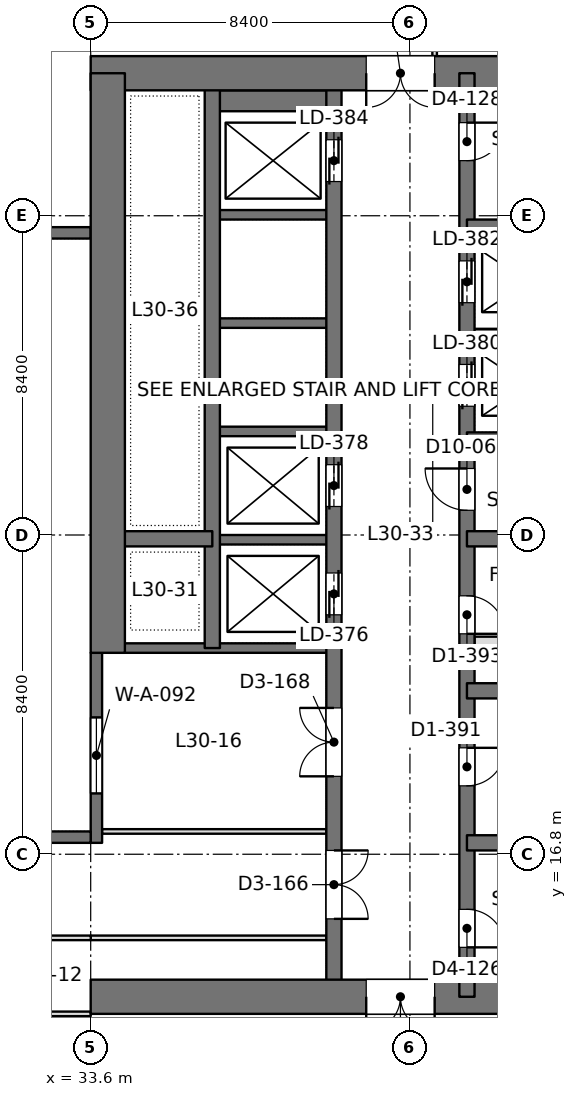
"""IFC4 building model, lengths in metres.
Left out: names, types, materials, properties, quantities, classifications, styles, units other than length and angle.
Written with IfcOpenShell. Run it as: python <this file> out.ifc"""

import sys

from ifc_helpers import new_model, si_unit, direction, frame, frame_2d, origin, place, context, subcontext, project, spatial, rectangle, extrude, element, fill, save


model = new_model("IFC4")
c1 = context("Model", 3, precision=1e-05, world=origin(), true_north=direction((0.0, 1.0)))
c2 = subcontext(c1, "Body", "Model", "MODEL_VIEW")
j1 = project(units=[si_unit("LENGTHUNIT", "METRE"), si_unit("PLANEANGLEUNIT", "RADIAN")], contexts=[c1])
p1 = place(None, origin())
s1 = spatial("IfcSite", under=j1, at=p1, CompositionType="ELEMENT")
p2 = place(p1, origin())
s2 = spatial("IfcBuilding", under=s1, at=p2, CompositionType="ELEMENT")
p3 = place(p2, frame((0.0, 0.0, 134.4)))
s3 = spatial("IfcBuildingStorey", under=s2, at=p3, CompositionType="ELEMENT", Elevation=134.4)
p4 = place(p3, frame((33.6, 13.05, 0.0), z_axis=(0.0, 0.0, 1.0), x_axis=(1.0, 0.0, 0.0)))
e1 = element("IfcWall", 1, at=p4, inside=s3, PredefinedType="SHEAR", context=c2, shape_type="SweptSolid", body=[
    extrude(rectangle(XDim=18.0, YDim=0.9, at=frame_2d((9.0, 0.0))), origin(), (0.0, 0.0, 1.0), 4.2),
])
p5 = place(p4, frame((7.25, 0.0, 0.0)))
e2 = element("IfcOpeningElement", 2, at=p5, cuts=e1, PredefinedType="OPENING", context=c2, shape_type="SweptSolid", body=[
    extrude(rectangle(XDim=1.8, YDim=2.4, at=frame_2d((0.9, 1.2))), frame((0.0, 0.46, 0.0), z_axis=(0.0, -1.0, 0.0), x_axis=(1.0, 0.0, 0.0)), (0.0, 0.0, 1.0), 0.92),
])
p6 = place(p3, frame((33.6, 37.35, 0.0), z_axis=(0.0, 0.0, 1.0), x_axis=(1.0, 0.0, 0.0)))
e3 = element("IfcWall", 3, at=p6, inside=s3, PredefinedType="SHEAR", context=c2, shape_type="SweptSolid", body=[
    extrude(rectangle(XDim=18.0, YDim=0.9, at=frame_2d((9.0, 0.0))), origin(), (0.0, 0.0, 1.0), 4.2),
])
p7 = place(p6, frame((7.25, 0.0, 0.0)))
e4 = element("IfcOpeningElement", 4, at=p7, cuts=e3, PredefinedType="OPENING", context=c2, shape_type="SweptSolid", body=[
    extrude(rectangle(XDim=1.8, YDim=2.4, at=frame_2d((0.9, 1.2))), frame((0.0, 0.46, 0.0), z_axis=(0.0, -1.0, 0.0), x_axis=(1.0, 0.0, 0.0)), (0.0, 0.0, 1.0), 0.92),
])
p8 = place(p3, frame((34.05, 22.1, 0.0), z_axis=(0.0, 0.0, 1.0), x_axis=(0.0, 1.0, 0.0)))
e5 = element("IfcWall", 5, at=p8, inside=s3, PredefinedType="SHEAR", context=c2, shape_type="SweptSolid", body=[
    extrude(rectangle(XDim=15.25, YDim=0.9, at=frame_2d((7.625, 0.0))), origin(), (0.0, 0.0, 1.0), 4.2),
])
p9 = place(p3, frame((43.5, 13.05, 0.0), z_axis=(0.0, 0.0, 1.0), x_axis=(0.0, 1.0, 0.0)))
e6 = element("IfcWall", 6, at=p9, inside=s3, PredefinedType="SHEAR", context=c2, shape_type="SweptSolid", body=[
    extrude(rectangle(XDim=24.3, YDim=0.4, at=frame_2d((12.15, 0.0))), origin(), (0.0, 0.0, 1.0), 4.2),
])
p10 = place(p9, frame((1.3, 0.0, 0.0)))
e7 = element("IfcOpeningElement", 7, at=p10, cuts=e6, PredefinedType="OPENING", context=c2, shape_type="SweptSolid", body=[
    extrude(rectangle(XDim=1.0, YDim=2.2, at=frame_2d((0.5, 1.1))), frame((0.0, 0.21, 0.0), z_axis=(0.0, -1.0, 0.0), x_axis=(1.0, 0.0, 0.0)), (0.0, 0.0, 1.0), 0.42),
])
p11 = place(p9, frame((22.0, 0.0, 0.0)))
e8 = element("IfcOpeningElement", 8, at=p11, cuts=e6, PredefinedType="OPENING", context=c2, shape_type="SweptSolid", body=[
    extrude(rectangle(XDim=1.0, YDim=2.2, at=frame_2d((0.5, 1.1))), frame((0.0, 0.21, 0.0), z_axis=(0.0, -1.0, 0.0), x_axis=(1.0, 0.0, 0.0)), (0.0, 0.0, 1.0), 0.42),
])
p12 = place(p9, frame((5.55, 0.0, 0.0)))
e9 = element("IfcOpeningElement", 9, at=p12, cuts=e6, PredefinedType="OPENING", context=c2, shape_type="SweptSolid", body=[
    extrude(rectangle(XDim=1.0, YDim=2.2, at=frame_2d((0.5, 1.1))), frame((0.0, 0.21, 0.0), z_axis=(0.0, -1.0, 0.0), x_axis=(1.0, 0.0, 0.0)), (0.0, 0.0, 1.0), 0.42),
])
p13 = place(p9, frame((9.55, 0.0, 0.0)))
e10 = element("IfcOpeningElement", 10, at=p13, cuts=e6, PredefinedType="OPENING", context=c2, shape_type="SweptSolid", body=[
    extrude(rectangle(XDim=1.0, YDim=2.2, at=frame_2d((0.5, 1.1))), frame((0.0, 0.21, 0.0), z_axis=(0.0, -1.0, 0.0), x_axis=(1.0, 0.0, 0.0)), (0.0, 0.0, 1.0), 0.42),
])
p14 = place(p9, frame((12.8, 0.0, 0.0)))
e11 = element("IfcOpeningElement", 11, at=p14, cuts=e6, PredefinedType="OPENING", context=c2, shape_type="SweptSolid", body=[
    extrude(rectangle(XDim=1.1, YDim=2.2, at=frame_2d((0.55, 1.1))), frame((0.0, 0.21, 0.0), z_axis=(0.0, -1.0, 0.0), x_axis=(1.0, 0.0, 0.0)), (0.0, 0.0, 1.0), 0.42),
])
p15 = place(p9, frame((15.538, 0.0, 0.0)))
e12 = element("IfcOpeningElement", 12, at=p15, cuts=e6, PredefinedType="OPENING", context=c2, shape_type="SweptSolid", body=[
    extrude(rectangle(XDim=1.1, YDim=2.2, at=frame_2d((0.55, 1.1))), frame((0.0, 0.21, 0.0), z_axis=(0.0, -1.0, 0.0), x_axis=(1.0, 0.0, 0.0)), (0.0, 0.0, 1.0), 0.42),
])
p16 = place(p9, frame((18.262, 0.0, 0.0)))
e13 = element("IfcOpeningElement", 13, at=p16, cuts=e6, PredefinedType="OPENING", context=c2, shape_type="SweptSolid", body=[
    extrude(rectangle(XDim=1.1, YDim=2.2, at=frame_2d((0.55, 1.1))), frame((0.0, 0.21, 0.0), z_axis=(0.0, -1.0, 0.0), x_axis=(1.0, 0.0, 0.0)), (0.0, 0.0, 1.0), 0.42),
])
p17 = place(p3, frame((40.0, 13.05, 0.0), z_axis=(0.0, 0.0, 1.0), x_axis=(0.0, 1.0, 0.0)))
e14 = element("IfcWall", 14, at=p17, inside=s3, PredefinedType="SHEAR", context=c2, shape_type="SweptSolid", body=[
    extrude(rectangle(XDim=24.3, YDim=0.4, at=frame_2d((12.15, 0.0))), origin(), (0.0, 0.0, 1.0), 4.2),
])
p18 = place(p17, frame((10.05, 0.0, 0.0)))
e15 = element("IfcOpeningElement", 15, at=p18, cuts=e14, PredefinedType="OPENING", context=c2, shape_type="SweptSolid", body=[
    extrude(rectangle(XDim=1.1, YDim=2.2, at=frame_2d((0.55, 1.1))), frame((0.0, 0.21, 0.0), z_axis=(0.0, -1.0, 0.0), x_axis=(1.0, 0.0, 0.0)), (0.0, 0.0, 1.0), 0.42),
])
p19 = place(p17, frame((12.9, 0.0, 0.0)))
e16 = element("IfcOpeningElement", 16, at=p19, cuts=e14, PredefinedType="OPENING", context=c2, shape_type="SweptSolid", body=[
    extrude(rectangle(XDim=1.1, YDim=2.2, at=frame_2d((0.55, 1.1))), frame((0.0, 0.21, 0.0), z_axis=(0.0, -1.0, 0.0), x_axis=(1.0, 0.0, 0.0)), (0.0, 0.0, 1.0), 0.42),
])
p20 = place(p17, frame((21.45, 0.0, 0.0)))
e17 = element("IfcOpeningElement", 17, at=p20, cuts=e14, PredefinedType="OPENING", context=c2, shape_type="SweptSolid", body=[
    extrude(rectangle(XDim=1.1, YDim=2.2, at=frame_2d((0.55, 1.1))), frame((0.0, 0.21, 0.0), z_axis=(0.0, -1.0, 0.0), x_axis=(1.0, 0.0, 0.0)), (0.0, 0.0, 1.0), 0.42),
])
p21 = place(p17, frame((2.05, 0.0, 0.0)))
e18 = element("IfcOpeningElement", 18, at=p21, cuts=e14, PredefinedType="OPENING", context=c2, shape_type="SweptSolid", body=[
    extrude(rectangle(XDim=1.8, YDim=2.4, at=frame_2d((0.9, 1.2))), frame((0.0, 0.21, 0.0), z_axis=(0.0, -1.0, 0.0), x_axis=(1.0, 0.0, 0.0)), (0.0, 0.0, 1.0), 0.42),
])
p22 = place(p17, frame((5.8, 0.0, 0.0)))
e19 = element("IfcOpeningElement", 19, at=p22, cuts=e14, PredefinedType="OPENING", context=c2, shape_type="SweptSolid", body=[
    extrude(rectangle(XDim=1.8, YDim=2.4, at=frame_2d((0.9, 1.2))), frame((0.0, 0.21, 0.0), z_axis=(0.0, -1.0, 0.0), x_axis=(1.0, 0.0, 0.0)), (0.0, 0.0, 1.0), 0.42),
])
p23 = place(p3, frame((36.8, 22.225, 0.0), z_axis=(0.0, 0.0, 1.0), x_axis=(0.0, 1.0, 0.0)))
e20 = element("IfcWall", 20, at=p23, inside=s3, PredefinedType="SHEAR", context=c2, shape_type="SweptSolid", body=[
    extrude(rectangle(XDim=15.125, YDim=0.4, at=frame_2d((7.562, 0.0))), origin(), (0.0, 0.0, 1.0), 4.2),
])
for number, where, z_axis, x_axis in (
    (21, (51.15, 17.1, 0.0), (0.0, 0.0, 1.0), (-1.0, 0.0, 0.0)),
    (22, (51.15, 21.1, 0.0), (0.0, 0.0, 1.0), (-1.0, 0.0, 0.0)),
    (23, (51.15, 25.1, 0.0), (0.0, 0.0, 1.0), (-1.0, 0.0, 0.0)),
    (24, (51.15, 27.7, 0.0), (0.0, 0.0, 1.0), (-1.0, 0.0, 0.0)),
    (25, (51.15, 33.3, 0.0), (0.0, 0.0, 1.0), (-1.0, 0.0, 0.0)),
):
    element("IfcWall", number, at=place(p3, frame(where, z_axis=z_axis, x_axis=x_axis)), inside=s3, PredefinedType="SHEAR", context=c2, shape_type="SweptSolid", body=[
        extrude(rectangle(XDim=7.65, YDim=0.4, at=frame_2d((3.825, 0.0))), origin(), (0.0, 0.0, 1.0), 4.2),
    ])
p24 = place(p3, frame((46.7, 30.5, 0.0), z_axis=(0.0, 0.0, 1.0), x_axis=(-1.0, 0.0, 0.0)))
e26 = element("IfcWall", 26, at=p24, inside=s3, PredefinedType="SHEAR", context=c2, shape_type="SweptSolid", body=[
    extrude(rectangle(XDim=3.2, YDim=0.25, at=frame_2d((1.6, 0.0))), origin(), (0.0, 0.0, 1.0), 4.2),
])
p25 = place(p3, frame((36.8, 25.1, 0.0), z_axis=(0.0, 0.0, 1.0), x_axis=(-1.0, 0.0, 0.0)))
e27 = element("IfcWall", 27, at=p25, inside=s3, PredefinedType="SHEAR", context=c2, shape_type="SweptSolid", body=[
    extrude(rectangle(XDim=2.75, YDim=0.4, at=frame_2d((1.375, 0.0))), origin(), (0.0, 0.0, 1.0), 4.2),
])
p26 = place(p3, frame((40.0, 22.225, 0.0), z_axis=(0.0, 0.0, 1.0), x_axis=(-1.0, 0.0, 0.0)))
e28 = element("IfcWall", 28, at=p26, inside=s3, PredefinedType="SHEAR", context=c2, shape_type="SweptSolid", body=[
    extrude(rectangle(XDim=5.95, YDim=0.25, at=frame_2d((2.975, 0.0))), origin(), (0.0, 0.0, 1.0), 4.2),
])
for number, where, z_axis, x_axis in (
    (29, (40.0, 25.075, 0.0), (0.0, 0.0, 1.0), (-1.0, 0.0, 0.0)),
    (30, (40.0, 27.925, 0.0), (0.0, 0.0, 1.0), (-1.0, 0.0, 0.0)),
    (31, (40.0, 30.775, 0.0), (0.0, 0.0, 1.0), (-1.0, 0.0, 0.0)),
    (32, (40.0, 33.625, 0.0), (0.0, 0.0, 1.0), (-1.0, 0.0, 0.0)),
):
    element("IfcWall", number, at=place(p3, frame(where, z_axis=z_axis, x_axis=x_axis)), inside=s3, PredefinedType="SHEAR", context=c2, shape_type="SweptSolid", body=[
        extrude(rectangle(XDim=3.2, YDim=0.25, at=frame_2d((1.6, 0.0))), origin(), (0.0, 0.0, 1.0), 4.2),
    ])
p27 = place(p3, frame((40.0, 36.625, 0.0), z_axis=(0.0, 0.0, 1.0), x_axis=(-1.0, 0.0, 0.0)))
e33 = element("IfcWall", 33, at=p27, inside=s3, PredefinedType="SHEAR", context=c2, shape_type="SweptSolid", body=[
    extrude(rectangle(XDim=3.2, YDim=0.55, at=frame_2d((1.6, 0.0))), origin(), (0.0, 0.0, 1.0), 4.2),
])
p28 = place(p3, frame((33.75, 17.1, 0.0), z_axis=(0.0, 0.0, 1.0), x_axis=(0.0, 1.0, 0.0)))
e34 = element("IfcWall", 34, at=p28, inside=s3, PredefinedType="SOLIDWALL", context=c2, shape_type="SweptSolid", body=[
    extrude(rectangle(XDim=5.0, YDim=0.3, at=frame_2d((2.5, 0.0))), origin(), (0.0, 0.0, 1.0), 4.05),
])
p29 = place(p28, frame((1.3, 0.0, 0.1)))
e35 = element("IfcOpeningElement", 35, at=p29, cuts=e34, PredefinedType="OPENING", context=c2, shape_type="SweptSolid", body=[
    extrude(rectangle(XDim=2.0, YDim=3.0, at=frame_2d((1.0, 1.5))), frame((0.0, 0.16, 0.0), z_axis=(0.0, -1.0, 0.0), x_axis=(1.0, 0.0, 0.0)), (0.0, 0.0, 1.0), 0.32),
])
p30 = place(p3, frame((26.025, 17.25, 0.0), z_axis=(0.0, 0.0, 1.0), x_axis=(1.0, 0.0, 0.0)))
e36 = element("IfcWall", 36, at=p30, inside=s3, PredefinedType="SOLIDWALL", context=c2, shape_type="SweptSolid", body=[
    extrude(rectangle(XDim=7.575, YDim=0.3, at=frame_2d((3.788, 0.0))), origin(), (0.0, 0.0, 1.0), 4.05),
])
p31 = place(p30, frame((0.587, 0.0, 0.1)))
e37 = element("IfcOpeningElement", 37, at=p31, cuts=e36, PredefinedType="OPENING", context=c2, shape_type="SweptSolid", body=[
    extrude(rectangle(XDim=2.0, YDim=3.0, at=frame_2d((1.0, 1.5))), frame((0.0, 0.16, 0.0), z_axis=(0.0, -1.0, 0.0), x_axis=(1.0, 0.0, 0.0)), (0.0, 0.0, 1.0), 0.32),
])
p32 = place(p30, frame((4.188, 0.0, 0.1)))
e38 = element("IfcOpeningElement", 38, at=p32, cuts=e36, PredefinedType="OPENING", context=c2, shape_type="SweptSolid", body=[
    extrude(rectangle(XDim=2.0, YDim=3.0, at=frame_2d((1.0, 1.5))), frame((0.0, 0.16, 0.0), z_axis=(0.0, -1.0, 0.0), x_axis=(1.0, 0.0, 0.0)), (0.0, 0.0, 1.0), 0.32),
])
p33 = place(p3, frame((26.025, 33.15, 0.0), z_axis=(0.0, 0.0, 1.0), x_axis=(1.0, 0.0, 0.0)))
e39 = element("IfcWall", 39, at=p33, inside=s3, PredefinedType="SOLIDWALL", context=c2, shape_type="SweptSolid", body=[
    extrude(rectangle(XDim=7.575, YDim=0.3, at=frame_2d((3.788, 0.0))), origin(), (0.0, 0.0, 1.0), 4.05),
])
p34 = place(p33, frame((0.587, 0.0, 0.1)))
e40 = element("IfcOpeningElement", 40, at=p34, cuts=e39, PredefinedType="OPENING", context=c2, shape_type="SweptSolid", body=[
    extrude(rectangle(XDim=2.0, YDim=3.0, at=frame_2d((1.0, 1.5))), frame((0.0, 0.16, 0.0), z_axis=(0.0, -1.0, 0.0), x_axis=(1.0, 0.0, 0.0)), (0.0, 0.0, 1.0), 0.32),
])
p35 = place(p33, frame((4.188, 0.0, 0.1)))
e41 = element("IfcOpeningElement", 41, at=p35, cuts=e39, PredefinedType="OPENING", context=c2, shape_type="SweptSolid", body=[
    extrude(rectangle(XDim=2.0, YDim=3.0, at=frame_2d((1.0, 1.5))), frame((0.0, 0.16, 0.0), z_axis=(0.0, -1.0, 0.0), x_axis=(1.0, 0.0, 0.0)), (0.0, 0.0, 1.0), 0.32),
])
p36 = place(p3, frame((33.898, 17.4, 0.0), z_axis=(0.0, 0.0, 1.0), x_axis=(1.0, 0.0, 0.0)))
e42 = element("IfcWall", 42, at=p36, inside=s3, PredefinedType="PARTITIONING", context=c2, shape_type="SweptSolid", body=[
    extrude(rectangle(XDim=5.904, YDim=0.12, at=frame_2d((2.952, 0.0))), origin(), (0.0, 0.0, 1.0), 3.55),
])
p37 = place(p3, frame((33.598, 14.6, 0.0), z_axis=(0.0, 0.0, 1.0), x_axis=(1.0, 0.0, 0.0)))
e43 = element("IfcWall", 43, at=p37, inside=s3, PredefinedType="PARTITIONING", context=c2, shape_type="SweptSolid", body=[
    extrude(rectangle(XDim=6.204, YDim=0.12, at=frame_2d((3.102, 0.0))), origin(), (0.0, 0.0, 1.0), 3.55),
])
p38 = place(p3, frame((16.798, 14.6, 0.0), z_axis=(0.0, 0.0, 1.0), x_axis=(1.0, 0.0, 0.0)))
e44 = element("IfcWall", 44, at=p38, inside=s3, PredefinedType="PARTITIONING", context=c2, shape_type="SweptSolid", body=[
    extrude(rectangle(XDim=16.804, YDim=0.12, at=frame_2d((8.402, 0.0))), origin(), (0.0, 0.0, 1.0), 3.55),
])
p39 = place(p38, frame((3.702, 0.0, 0.0)))
e45 = element("IfcOpeningElement", 45, at=p39, cuts=e44, PredefinedType="OPENING", context=c2, shape_type="SweptSolid", body=[
    extrude(rectangle(XDim=1.0, YDim=2.4, at=frame_2d((0.5, 1.2))), frame((0.0, 0.07, 0.0), z_axis=(0.0, -1.0, 0.0), x_axis=(1.0, 0.0, 0.0)), (0.0, 0.0, 1.0), 0.14),
])
p40 = place(p38, frame((12.102, 0.0, 0.0)))
e46 = element("IfcOpeningElement", 46, at=p40, cuts=e44, PredefinedType="OPENING", context=c2, shape_type="SweptSolid", body=[
    extrude(rectangle(XDim=1.0, YDim=2.4, at=frame_2d((0.5, 1.2))), frame((0.0, 0.07, 0.0), z_axis=(0.0, -1.0, 0.0), x_axis=(1.0, 0.0, 0.0)), (0.0, 0.0, 1.0), 0.14),
])
p41 = place(p3, frame((16.8, 12.6, 0.0), z_axis=(0.0, 0.0, 1.0), x_axis=(1.0, 0.0, 0.0)))
e47 = element("IfcWall", 47, at=p41, inside=s3, PredefinedType="PARTITIONING", context=c2, shape_type="SweptSolid", body=[
    extrude(rectangle(XDim=16.8, YDim=0.12, at=frame_2d((8.4, 0.0))), origin(), (0.0, 0.0, 1.0), 3.55),
])
p42 = place(p3, frame((42.65, 37.8, 0.0), z_axis=(0.0, 0.0, 1.0), x_axis=(0.0, 1.0, 0.0)))
e48 = element("IfcWall", 48, at=p42, inside=s3, PredefinedType="PARTITIONING", context=c2, shape_type="SweptSolid", body=[
    extrude(rectangle(XDim=2.0, YDim=0.12, at=frame_2d((1.0, 0.0))), origin(), (0.0, 0.0, 1.0), 4.05),
])
p43 = place(p3, frame((43.7, 22.4, 0.0), z_axis=(0.0, 0.0, 1.0), x_axis=(1.0, 0.0, 0.0)))
e49 = element("IfcWall", 49, at=p43, inside=s3, PredefinedType="PARTITIONING", context=c2, shape_type="SweptSolid", body=[
    extrude(rectangle(XDim=6.6, YDim=0.25, at=frame_2d((3.3, 0.0))), origin(), (0.0, 0.0, 1.0), 4.0),
])
p44 = place(p43, frame((2.825, 0.0, 0.0)))
e50 = element("IfcOpeningElement", 50, at=p44, cuts=e49, PredefinedType="OPENING", context=c2, shape_type="SweptSolid", body=[
    extrude(rectangle(XDim=0.9, YDim=2.2, at=frame_2d((0.45, 1.1))), frame((0.0, 0.135, 0.0), z_axis=(0.0, -1.0, 0.0), x_axis=(1.0, 0.0, 0.0)), (0.0, 0.0, 1.0), 0.27),
])
p45 = place(p29, origin())
e51 = element("IfcWindow", 51, at=p45, inside=s3, PartitioningType="SINGLE_PANEL", PredefinedType="WINDOW", context=c2, shape_type="SweptSolid", body=[
    extrude(rectangle(XDim=2.0, YDim=3.0, at=frame_2d((1.0, 1.5))), frame((0.0, 0.03, 0.0), z_axis=(0.0, -1.0, 0.0), x_axis=(1.0, 0.0, 0.0)), (0.0, 0.0, 1.0), 0.06),
])
fill(e35, e51)
p46 = place(p5, frame((1.8, 0.0, 0.0), z_axis=(0.0, 0.0, 1.0), x_axis=(-1.0, 0.0, 0.0)))
e52 = element("IfcDoor", 52, at=p46, inside=s3, OperationType="DOUBLE_DOOR_SINGLE_SWING", PredefinedType="DOOR", context=c2, shape_type="SweptSolid", body=[
    extrude(rectangle(XDim=1.8, YDim=2.4, at=frame_2d((0.9, 1.2))), frame((0.0, 0.025, 0.0), z_axis=(0.0, -1.0, 0.0), x_axis=(1.0, 0.0, 0.0)), (0.0, 0.0, 1.0), 0.05),
])
fill(e2, e52)
p47 = place(p7, frame((1.8, 0.0, 0.0), z_axis=(0.0, 0.0, 1.0), x_axis=(-1.0, 0.0, 0.0)))
e53 = element("IfcDoor", 53, at=p47, inside=s3, OperationType="DOUBLE_DOOR_SINGLE_SWING", PredefinedType="DOOR", context=c2, shape_type="SweptSolid", body=[
    extrude(rectangle(XDim=1.8, YDim=2.4, at=frame_2d((0.9, 1.2))), frame((0.0, 0.025, 0.0), z_axis=(0.0, -1.0, 0.0), x_axis=(1.0, 0.0, 0.0)), (0.0, 0.0, 1.0), 0.05),
])
fill(e4, e53)
p48 = place(p10, frame((1.0, 0.0, 0.0), z_axis=(0.0, 0.0, 1.0), x_axis=(-1.0, 0.0, 0.0)))
e54 = element("IfcDoor", 54, at=p48, inside=s3, OperationType="SINGLE_SWING_RIGHT", PredefinedType="DOOR", context=c2, shape_type="SweptSolid", body=[
    extrude(rectangle(XDim=1.0, YDim=2.2, at=frame_2d((0.5, 1.1))), frame((0.0, 0.025, 0.0), z_axis=(0.0, -1.0, 0.0), x_axis=(1.0, 0.0, 0.0)), (0.0, 0.0, 1.0), 0.05),
])
fill(e7, e54)
p49 = place(p11, frame((1.0, 0.0, 0.0), z_axis=(0.0, 0.0, 1.0), x_axis=(-1.0, 0.0, 0.0)))
e55 = element("IfcDoor", 55, at=p49, inside=s3, OperationType="SINGLE_SWING_LEFT", PredefinedType="DOOR", context=c2, shape_type="SweptSolid", body=[
    extrude(rectangle(XDim=1.0, YDim=2.2, at=frame_2d((0.5, 1.1))), frame((0.0, 0.025, 0.0), z_axis=(0.0, -1.0, 0.0), x_axis=(1.0, 0.0, 0.0)), (0.0, 0.0, 1.0), 0.05),
])
fill(e8, e55)
p50 = place(p12, frame((1.0, 0.0, 0.0), z_axis=(0.0, 0.0, 1.0), x_axis=(-1.0, 0.0, 0.0)))
e56 = element("IfcDoor", 56, at=p50, inside=s3, OperationType="SINGLE_SWING_LEFT", PredefinedType="DOOR", context=c2, shape_type="SweptSolid", body=[
    extrude(rectangle(XDim=1.0, YDim=2.2, at=frame_2d((0.5, 1.1))), frame((0.0, 0.025, 0.0), z_axis=(0.0, -1.0, 0.0), x_axis=(1.0, 0.0, 0.0)), (0.0, 0.0, 1.0), 0.05),
])
fill(e9, e56)
p51 = place(p13, frame((1.0, 0.0, 0.0), z_axis=(0.0, 0.0, 1.0), x_axis=(-1.0, 0.0, 0.0)))
e57 = element("IfcDoor", 57, at=p51, inside=s3, OperationType="SINGLE_SWING_RIGHT", PredefinedType="DOOR", context=c2, shape_type="SweptSolid", body=[
    extrude(rectangle(XDim=1.0, YDim=2.2, at=frame_2d((0.5, 1.1))), frame((0.0, 0.025, 0.0), z_axis=(0.0, -1.0, 0.0), x_axis=(1.0, 0.0, 0.0)), (0.0, 0.0, 1.0), 0.05),
])
fill(e10, e57)
p52 = place(p14, origin())
e58 = element("IfcDoor", 58, at=p52, inside=s3, OperationType="SINGLE_SWING_RIGHT", PredefinedType="DOOR", context=c2, shape_type="SweptSolid", body=[
    extrude(rectangle(XDim=1.1, YDim=2.2, at=frame_2d((0.55, 1.1))), frame((0.0, 0.025, 0.0), z_axis=(0.0, -1.0, 0.0), x_axis=(1.0, 0.0, 0.0)), (0.0, 0.0, 1.0), 0.05),
])
fill(e11, e58)
p53 = place(p18, origin())
e59 = element("IfcDoor", 59, at=p53, inside=s3, OperationType="DOUBLE_DOOR_SLIDING", PredefinedType="DOOR", context=c2, shape_type="SweptSolid", body=[
    extrude(rectangle(XDim=1.1, YDim=2.2, at=frame_2d((0.55, 1.1))), frame((0.0, 0.025, 0.0), z_axis=(0.0, -1.0, 0.0), x_axis=(1.0, 0.0, 0.0)), (0.0, 0.0, 1.0), 0.05),
])
fill(e15, e59)
p54 = place(p19, origin())
e60 = element("IfcDoor", 60, at=p54, inside=s3, OperationType="DOUBLE_DOOR_SLIDING", PredefinedType="DOOR", context=c2, shape_type="SweptSolid", body=[
    extrude(rectangle(XDim=1.1, YDim=2.2, at=frame_2d((0.55, 1.1))), frame((0.0, 0.025, 0.0), z_axis=(0.0, -1.0, 0.0), x_axis=(1.0, 0.0, 0.0)), (0.0, 0.0, 1.0), 0.05),
])
fill(e16, e60)
p55 = place(p20, origin())
e61 = element("IfcDoor", 61, at=p55, inside=s3, OperationType="DOUBLE_DOOR_SLIDING", PredefinedType="DOOR", context=c2, shape_type="SweptSolid", body=[
    extrude(rectangle(XDim=1.1, YDim=2.2, at=frame_2d((0.55, 1.1))), frame((0.0, 0.025, 0.0), z_axis=(0.0, -1.0, 0.0), x_axis=(1.0, 0.0, 0.0)), (0.0, 0.0, 1.0), 0.05),
])
fill(e17, e61)
p56 = place(p15, origin())
e62 = element("IfcDoor", 62, at=p56, inside=s3, OperationType="DOUBLE_DOOR_SLIDING", PredefinedType="DOOR", context=c2, shape_type="SweptSolid", body=[
    extrude(rectangle(XDim=1.1, YDim=2.2, at=frame_2d((0.55, 1.1))), frame((0.0, 0.025, 0.0), z_axis=(0.0, -1.0, 0.0), x_axis=(1.0, 0.0, 0.0)), (0.0, 0.0, 1.0), 0.05),
])
fill(e12, e62)
p57 = place(p16, origin())
e63 = element("IfcDoor", 63, at=p57, inside=s3, OperationType="DOUBLE_DOOR_SLIDING", PredefinedType="DOOR", context=c2, shape_type="SweptSolid", body=[
    extrude(rectangle(XDim=1.1, YDim=2.2, at=frame_2d((0.55, 1.1))), frame((0.0, 0.025, 0.0), z_axis=(0.0, -1.0, 0.0), x_axis=(1.0, 0.0, 0.0)), (0.0, 0.0, 1.0), 0.05),
])
fill(e13, e63)
p58 = place(p21, frame((1.8, 0.0, 0.0), z_axis=(0.0, 0.0, 1.0), x_axis=(-1.0, 0.0, 0.0)))
e64 = element("IfcDoor", 64, at=p58, inside=s3, OperationType="DOUBLE_DOOR_SINGLE_SWING", PredefinedType="DOOR", context=c2, shape_type="SweptSolid", body=[
    extrude(rectangle(XDim=1.8, YDim=2.4, at=frame_2d((0.9, 1.2))), frame((0.0, 0.025, 0.0), z_axis=(0.0, -1.0, 0.0), x_axis=(1.0, 0.0, 0.0)), (0.0, 0.0, 1.0), 0.05),
])
fill(e18, e64)
p59 = place(p22, origin())
e65 = element("IfcDoor", 65, at=p59, inside=s3, OperationType="DOUBLE_DOOR_SINGLE_SWING", PredefinedType="DOOR", context=c2, shape_type="SweptSolid", body=[
    extrude(rectangle(XDim=1.8, YDim=2.4, at=frame_2d((0.9, 1.2))), frame((0.0, 0.025, 0.0), z_axis=(0.0, -1.0, 0.0), x_axis=(1.0, 0.0, 0.0)), (0.0, 0.0, 1.0), 0.05),
])
fill(e19, e65)
save(model, sys.argv[1])
